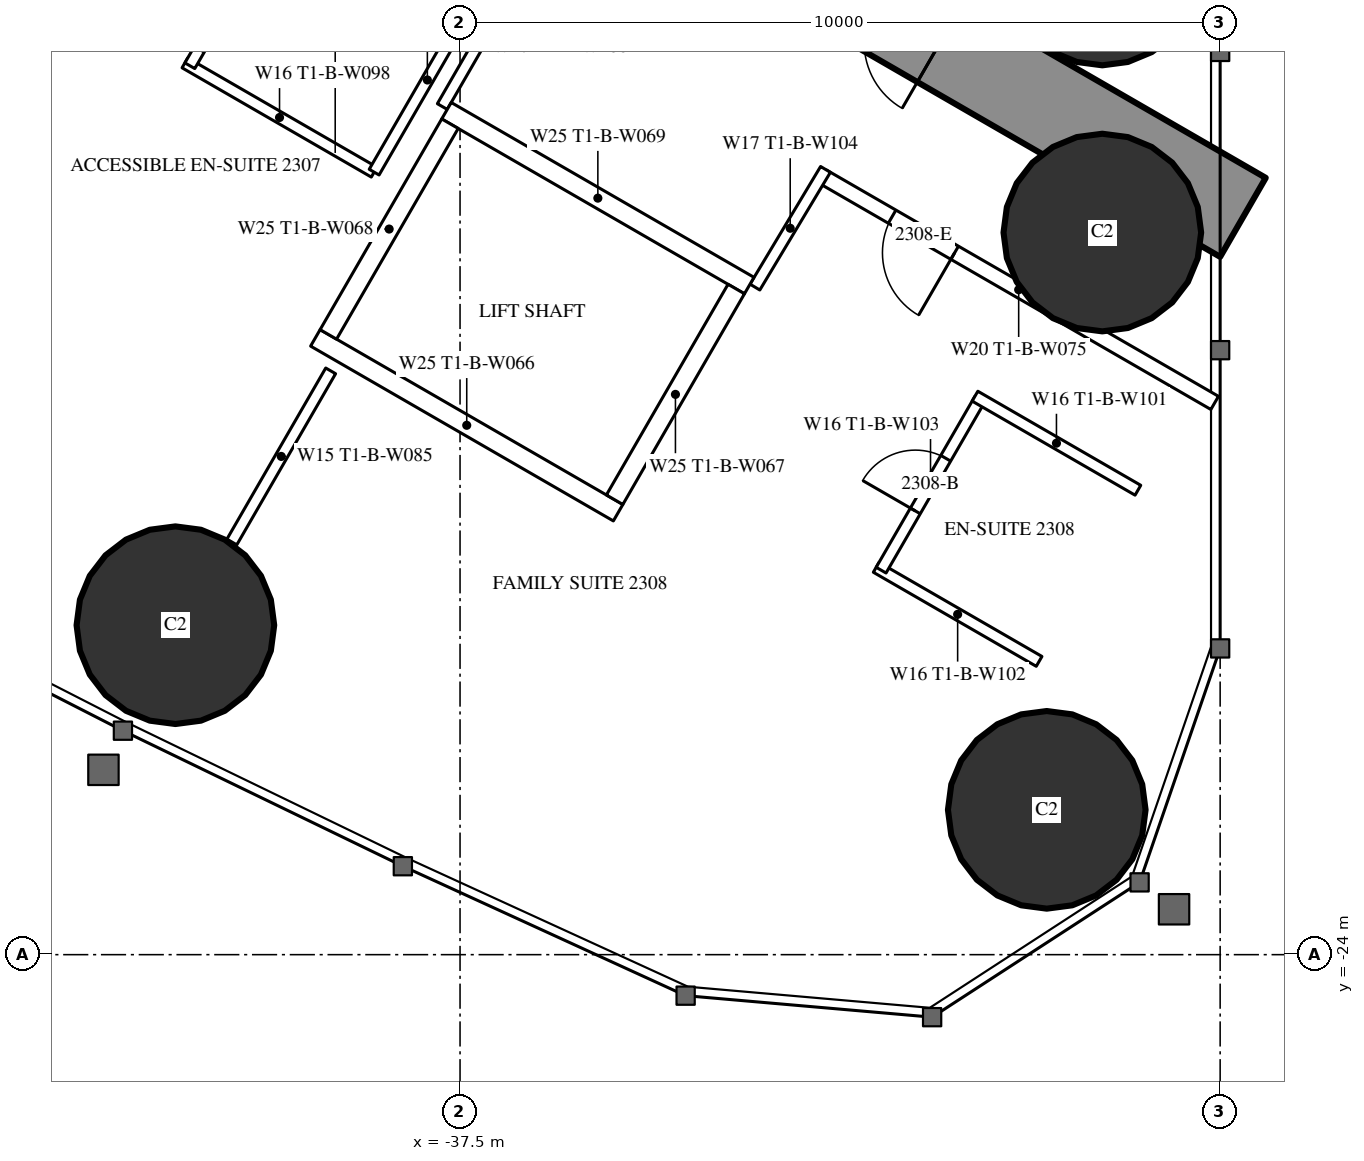
"""IFC4 building model, lengths in metres.
Left out: names, types, materials, properties, quantities, classifications, styles, units other than length and angle.
Written with IfcOpenShell. Run it as: python <this file> out.ifc"""

import sys

from ifc_helpers import new_model, si_unit, direction, frame, frame_2d, origin, origin_2d, place, context, subcontext, project, spatial, rectangle, hollow_circle, extrude, element, fill, save


model = new_model("IFC4")
c1 = context("Model", 3, precision=1e-05, world=origin(), true_north=direction((0.0, 1.0)))
c2 = subcontext(c1, "Body", "Model", "MODEL_VIEW")
j1 = project(units=[si_unit("LENGTHUNIT", "METRE"), si_unit("PLANEANGLEUNIT", "RADIAN")], contexts=[c1])
p1 = place(None, origin())
s1 = spatial("IfcSite", under=j1, at=p1, CompositionType="ELEMENT")
p2 = place(p1, origin())
s2 = spatial("IfcBuilding", under=s1, at=p2, CompositionType="ELEMENT")
p3 = place(p2, frame((0.0, 0.0, 90.6)))
s3 = spatial("IfcBuildingStorey", under=s2, at=p3, CompositionType="ELEMENT", Elevation=90.6)
for number, where, z_axis, x_axis in (
    (1, (-29.781, -22.095, 0.0), (0.0, 0.0, 1.0), (1.0, 0.0, 0.0)),
    (2, (-29.05, -11.0, 0.0), (0.0, 0.0, 1.0), (1.0, 0.0, 0.0)),
    (3, (-29.05, -14.5, 0.0), (0.0, 0.0, 1.0), (1.0, 0.0, 0.0)),
    (4, (-41.245, -19.666, 0.0), (0.0, 0.0, 1.0), (1.0, 0.0, 0.0)),
):
    element("IfcColumn", number, at=place(p3, frame(where, z_axis=z_axis, x_axis=x_axis)), inside=s3, PredefinedType="COLUMN", context=c2, shape_type="SweptSolid", body=[
        extrude(hollow_circle(Radius=1.3, WallThickness=0.1, at=origin_2d()), origin(), (0.0, 0.0, 1.0), 3.5),
    ])
p4 = place(p3, frame((-27.2, -14.3, 0.0), z_axis=(0.0, 0.0, 1.0), x_axis=(-0.866024021859, 0.500002393557, 0.0)))
e5 = element("IfcWall", 5, at=p4, inside=s3, PredefinedType="SHEAR", context=c2, shape_type="SweptSolid", body=[
    extrude(rectangle(XDim=27.907, YDim=1.2, at=frame_2d((13.954, 0.0))), origin(), (0.0, 0.0, 1.0), 3.5),
])
p5 = place(p4, frame((4.6, 0.0, 0.0)))
e6 = element("IfcOpeningElement", 6, at=p5, cuts=e5, PredefinedType="OPENING", context=c2, shape_type="SweptSolid", body=[
    extrude(rectangle(XDim=1.0, YDim=2.2, at=frame_2d((0.5, 1.1))), frame((0.0, 0.61, 0.0), z_axis=(0.0, -1.0, 0.0), x_axis=(1.0, 0.0, 0.0)), (0.0, 0.0, 1.0), 1.22),
])
p6 = place(p4, frame((13.395, 0.0, 0.0)))
e7 = element("IfcOpeningElement", 7, at=p6, cuts=e5, PredefinedType="OPENING", context=c2, shape_type="SweptSolid", body=[
    extrude(rectangle(XDim=1.8, YDim=2.2, at=frame_2d((0.9, 1.1))), frame((0.0, 0.61, 0.0), z_axis=(0.0, -1.0, 0.0), x_axis=(1.0, 0.0, 0.0)), (0.0, 0.0, 1.0), 1.22),
])
p7 = place(p3, frame((-39.202, -16.32, 0.0), z_axis=(0.0, 0.0, 1.0), x_axis=(-0.49997716683, -0.86603858612, 0.0)))
e8 = element("IfcWall", 8, at=p7, inside=s3, PredefinedType="PARTITIONING", context=c2, shape_type="SweptSolid", body=[
    extrude(rectangle(XDim=2.6, YDim=0.15, at=frame_2d((1.3, 0.0))), origin(), (0.0, 0.0, 1.0), 3.25),
])
p8 = place(p3, frame((-27.572, -16.741, 0.0), z_axis=(0.0, 0.0, 1.0), x_axis=(-0.866024464444, 0.500001626982, 0.0)))
e9 = element("IfcWall", 9, at=p8, inside=s3, PredefinedType="PARTITIONING", context=c2, shape_type="SweptSolid", body=[
    extrude(rectangle(XDim=5.955, YDim=0.2, at=frame_2d((2.978, 0.0))), origin(), (0.0, 0.0, 1.0), 3.25),
])
p9 = place(p8, frame((3.95, 0.0, 0.0)))
e10 = element("IfcOpeningElement", 10, at=p9, cuts=e9, PredefinedType="OPENING", context=c2, shape_type="SweptSolid", body=[
    extrude(rectangle(XDim=0.95, YDim=2.2, at=frame_2d((0.475, 1.1))), frame((0.0, 0.11, 0.0), z_axis=(0.0, -1.0, 0.0), x_axis=(1.0, 0.0, 0.0)), (0.0, 0.0, 1.0), 0.22),
])
p10 = place(p3, frame((-36.831, -11.28, 0.0), z_axis=(0.0, 0.0, 1.0), x_axis=(-0.499937177781, -0.866061671171, 0.0)))
e11 = element("IfcWall", 11, at=p10, inside=s3, PredefinedType="PARTITIONING", context=c2, shape_type="SweptSolid", body=[
    extrude(rectangle(XDim=1.804, YDim=0.15, at=frame_2d((0.902, 0.0))), origin(), (0.0, 0.0, 1.0), 3.25),
])
p11 = place(p3, frame((-33.621, -15.218, 0.0), z_axis=(0.0, 0.0, 1.0), x_axis=(0.514336634837, 0.857588377991, 0.0)))
e12 = element("IfcWall", 12, at=p11, inside=s3, PredefinedType="PARTITIONING", context=c2, shape_type="SweptSolid", body=[
    extrude(rectangle(XDim=1.805, YDim=0.15, at=frame_2d((0.903, 0.0))), origin(), (0.0, 0.0, 1.0), 3.25),
])
p12 = place(p3, frame((-38.63, -13.705, 0.0), z_axis=(0.0, 0.0, 1.0), x_axis=(-0.866018712932, 0.500011588718, 0.0)))
e13 = element("IfcWall", 13, at=p12, inside=s3, PredefinedType="PARTITIONING", context=c2, shape_type="SweptSolid", body=[
    extrude(rectangle(XDim=2.875, YDim=0.15, at=frame_2d((1.438, 0.0))), origin(), (0.0, 0.0, 1.0), 3.25),
])
p13 = place(p3, frame((-39.655, -9.88, 0.0), z_axis=(0.0, 0.0, 1.0), x_axis=(-0.500049511043, -0.865996816683, 0.0)))
e14 = element("IfcWall", 14, at=p13, inside=s3, PredefinedType="PARTITIONING", context=c2, shape_type="SweptSolid", body=[
    extrude(rectangle(XDim=2.8, YDim=0.15, at=frame_2d((1.4, 0.0))), origin(), (0.0, 0.0, 1.0), 3.25),
])
p14 = place(p13, frame((1.55, 0.0, 0.0)))
e15 = element("IfcOpeningElement", 15, at=p14, cuts=e14, PredefinedType="OPENING", context=c2, shape_type="SweptSolid", body=[
    extrude(rectangle(XDim=1.0, YDim=2.2, at=frame_2d((0.5, 1.1))), frame((0.0, 0.085, 0.0), z_axis=(0.0, -1.0, 0.0), x_axis=(1.0, 0.0, 0.0)), (0.0, 0.0, 1.0), 0.17),
])
p15 = place(p3, frame((-37.23, -11.281, 0.0), z_axis=(0.0, 0.0, 1.0), x_axis=(-0.500049511043, -0.865996816683, 0.0)))
e16 = element("IfcWall", 16, at=p15, inside=s3, PredefinedType="PARTITIONING", context=c2, shape_type="SweptSolid", body=[
    extrude(rectangle(XDim=2.8, YDim=0.15, at=frame_2d((1.4, 0.0))), origin(), (0.0, 0.0, 1.0), 3.25),
])
p16 = place(p3, frame((-29.882, -20.142, 0.0), z_axis=(0.0, 0.0, 1.0), x_axis=(-0.866031185235, 0.4999899861, 0.0)))
e17 = element("IfcWall", 17, at=p16, inside=s3, PredefinedType="PARTITIONING", context=c2, shape_type="SweptSolid", body=[
    extrude(rectangle(XDim=2.475, YDim=0.15, at=frame_2d((1.238, 0.0))), origin(), (0.0, 0.0, 1.0), 3.25),
])
p17 = place(p3, frame((-30.66, -16.69, 0.0), z_axis=(0.0, 0.0, 1.0), x_axis=(-0.499936506574, -0.866062058628, 0.0)))
e18 = element("IfcWall", 18, at=p17, inside=s3, PredefinedType="PARTITIONING", context=c2, shape_type="SweptSolid", body=[
    extrude(rectangle(XDim=2.6, YDim=0.15, at=frame_2d((1.3, 0.0))), origin(), (0.0, 0.0, 1.0), 3.25),
])
p18 = place(p17, frame((0.9, 0.0, 0.0)))
e19 = element("IfcOpeningElement", 19, at=p18, cuts=e18, PredefinedType="OPENING", context=c2, shape_type="SweptSolid", body=[
    extrude(rectangle(XDim=0.8, YDim=2.2, at=frame_2d((0.4, 1.1))), frame((0.0, 0.085, 0.0), z_axis=(0.0, -1.0, 0.0), x_axis=(1.0, 0.0, 0.0)), (0.0, 0.0, 1.0), 0.17),
])
p19 = place(p3, frame((-28.582, -17.89, 0.0), z_axis=(0.0, 0.0, 1.0), x_axis=(-0.866073894602, 0.499916002032, 0.0)))
e20 = element("IfcWall", 20, at=p19, inside=s3, PredefinedType="PARTITIONING", context=c2, shape_type="SweptSolid", body=[
    extrude(rectangle(XDim=2.475, YDim=0.15, at=frame_2d((1.238, 0.0))), origin(), (0.0, 0.0, 1.0), 3.25),
])
p20 = place(p3, frame((-33.696, -15.197, 0.0), z_axis=(0.0, 0.0, 1.0), x_axis=(-0.865976953817, 0.500083908417, 0.0)))
e21 = element("IfcWall", 21, at=p20, inside=s3, PredefinedType="PARTITIONING", context=c2, shape_type="SweptSolid", body=[
    extrude(rectangle(XDim=4.599, YDim=0.25, at=frame_2d((2.3, 0.0))), origin(), (0.0, 0.0, 1.0), 3.25),
])
p21 = place(p3, frame((-35.42, -18.186, 0.0), z_axis=(0.0, 0.0, 1.0), x_axis=(-0.865990227814, 0.50006092162, 0.0)))
e22 = element("IfcWall", 22, at=p21, inside=s3, PredefinedType="PARTITIONING", context=c2, shape_type="SweptSolid", body=[
    extrude(rectangle(XDim=4.6, YDim=0.25, at=frame_2d((2.3, 0.0))), origin(), (0.0, 0.0, 1.0), 3.25),
])
p22 = place(p3, frame((-33.866, -15.243, 0.0), z_axis=(0.0, 0.0, 1.0), x_axis=(-0.499929347863, -0.866066190972, 0.0)))
e23 = element("IfcWall", 23, at=p22, inside=s3, PredefinedType="PARTITIONING", context=c2, shape_type="SweptSolid", body=[
    extrude(rectangle(XDim=3.201, YDim=0.25, at=frame_2d((1.6, 0.0))), origin(), (0.0, 0.0, 1.0), 3.25),
])
p23 = place(p3, frame((-37.633, -13.068, 0.0), z_axis=(0.0, 0.0, 1.0), x_axis=(-0.499872130319, -0.866099216793, 0.0)))
e24 = element("IfcWall", 24, at=p23, inside=s3, PredefinedType="PARTITIONING", context=c2, shape_type="SweptSolid", body=[
    extrude(rectangle(XDim=3.2, YDim=0.25, at=frame_2d((1.6, 0.0))), origin(), (0.0, 0.0, 1.0), 3.25),
])
p24 = place(p18, origin())
e25 = element("IfcDoor", 25, at=p24, inside=s3, OperationType="SINGLE_SWING_RIGHT", PredefinedType="DOOR", context=c2, shape_type="SweptSolid", body=[
    extrude(rectangle(XDim=0.8, YDim=2.2, at=frame_2d((0.4, 1.1))), frame((0.0, 0.025, 0.0), z_axis=(0.0, -1.0, 0.0), x_axis=(1.0, 0.0, 0.0)), (0.0, 0.0, 1.0), 0.05),
])
fill(e19, e25)
p25 = place(p9, origin())
e26 = element("IfcDoor", 26, at=p25, inside=s3, OperationType="SINGLE_SWING_LEFT", PredefinedType="DOOR", context=c2, shape_type="SweptSolid", body=[
    extrude(rectangle(XDim=0.95, YDim=2.2, at=frame_2d((0.475, 1.1))), frame((0.0, 0.025, 0.0), z_axis=(0.0, -1.0, 0.0), x_axis=(1.0, 0.0, 0.0)), (0.0, 0.0, 1.0), 0.05),
])
fill(e10, e26)
save(model, sys.argv[1])
